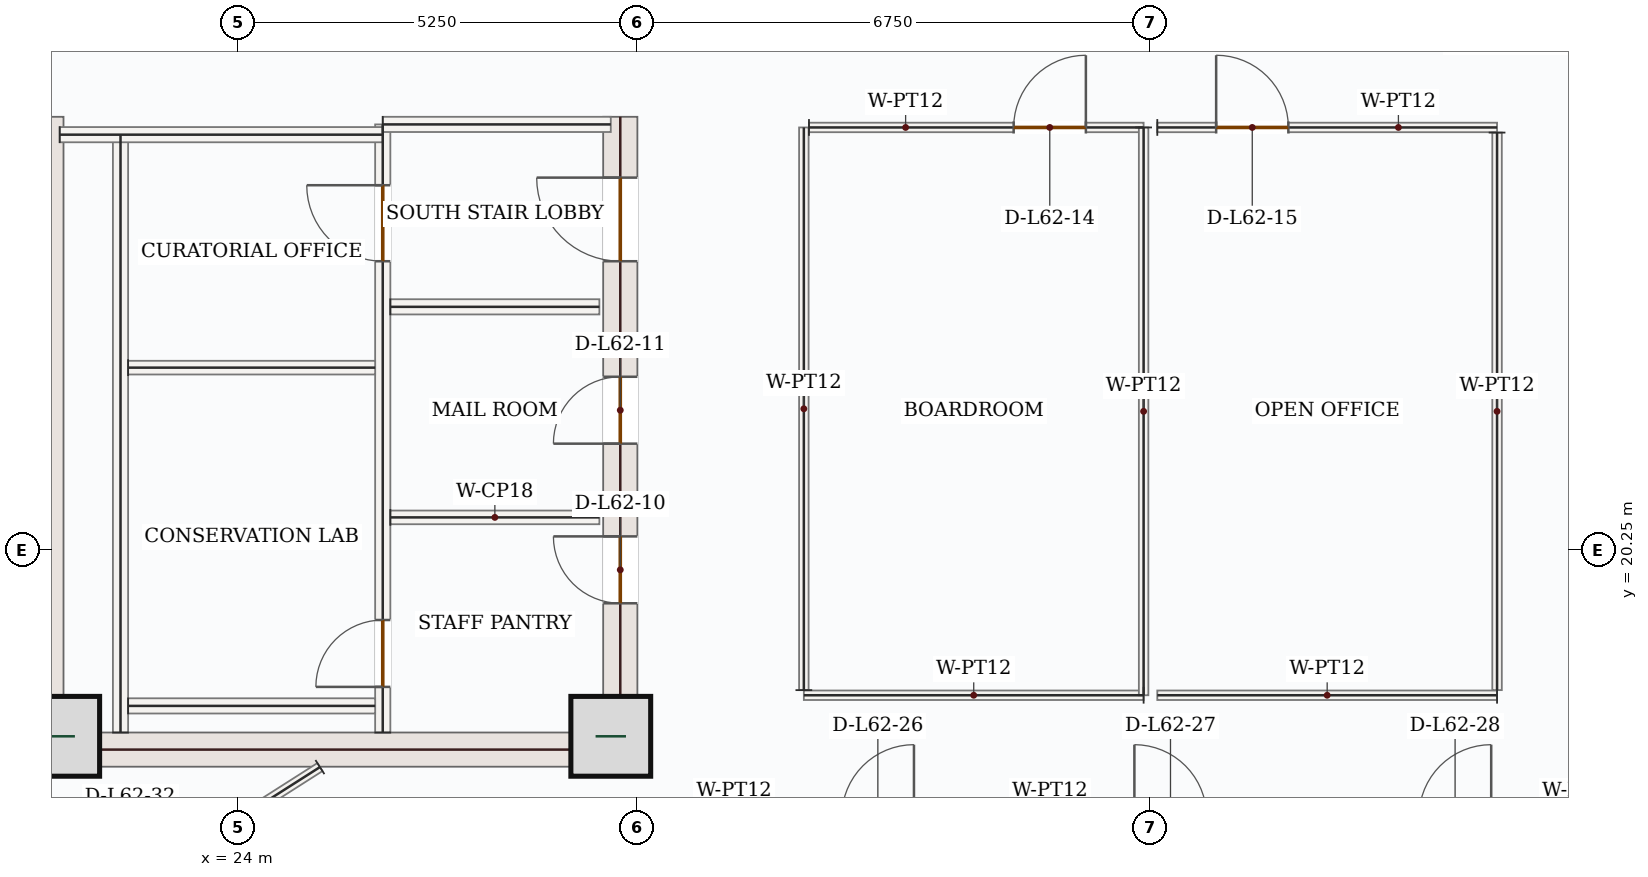
"""IFC4 building model, lengths in metres.
Left out: names, types, materials, properties, quantities, classifications, styles, units other than length and angle.
Written with IfcOpenShell. Run it as: python <this file> out.ifc"""

import sys

from ifc_helpers import new_model, si_unit, direction, frame, frame_2d, origin, origin_2d, place, context, subcontext, project, spatial, rectangle, extrude, source, transform, mapped, element, fill, save


model = new_model("IFC4")
c1 = context("Model", 3, precision=1e-05, world=origin(), true_north=direction((0.0, 1.0)))
c2 = subcontext(c1, "Body", "Model", "MODEL_VIEW")
j1 = project(units=[si_unit("LENGTHUNIT", "METRE"), si_unit("PLANEANGLEUNIT", "RADIAN")], contexts=[c1])
p1 = place(None, origin())
s1 = spatial("IfcSite", under=j1, at=p1, CompositionType="ELEMENT")
p2 = place(p1, origin())
s2 = spatial("IfcBuilding", under=s1, at=p2, CompositionType="ELEMENT")
p3 = place(p2, frame((0.0, 0.0, 261.6)))
s3 = spatial("IfcBuildingStorey", under=s2, at=p3, CompositionType="ELEMENT", Elevation=261.6)
m1 = source(origin(), c2, "Body", "SweptSolid", [
    extrude(rectangle(XDim=8.55, YDim=0.45, at=frame_2d((4.275, 0.0))), origin(), (0.0, 0.0, 1.0), 3.5),
])
p4 = place(p3, frame((21.475, 17.4, 0.0), z_axis=(0.0, 0.0, 1.0), x_axis=(0.0, 1.0, 0.0)))
e1 = element("IfcWall", 1, at=p4, inside=s3, PredefinedType="SHEAR", context=c2, shape_type="MappedRepresentation", body=[
    mapped(m1, transform((0.0, 0.0, 0.0), x_axis=(1.0, 0.0, 0.0), y_axis=(0.0, 1.0, 0.0), z_axis=(0.0, 0.0, 1.0), scale=1.0)),
])
p5 = place(p3, frame((29.025, 17.4, 0.0), z_axis=(0.0, 0.0, 1.0), x_axis=(0.0, 1.0, 0.0)))
e2 = element("IfcWall", 2, at=p5, inside=s3, PredefinedType="SHEAR", context=c2, shape_type="SweptSolid", body=[
    extrude(rectangle(XDim=8.55, YDim=0.45, at=frame_2d((4.275, 0.0))), origin(), (0.0, 0.0, 1.0), 3.5),
])
p6 = place(p5, frame((6.65, 0.0, 0.0)))
e3 = element("IfcOpeningElement", 3, at=p6, cuts=e2, PredefinedType="OPENING", context=c2, shape_type="SweptSolid", body=[
    extrude(rectangle(XDim=1.1, YDim=2.2, at=frame_2d((0.55, 1.1))), frame((0.0, 0.235, 0.0), z_axis=(0.0, -1.0, 0.0), x_axis=(1.0, 0.0, 0.0)), (0.0, 0.0, 1.0), 0.47),
])
p7 = place(p5, frame((2.15, 0.0, 0.0)))
e4 = element("IfcOpeningElement", 4, at=p7, cuts=e2, PredefinedType="OPENING", context=c2, shape_type="SweptSolid", body=[
    extrude(rectangle(XDim=0.88, YDim=2.1, at=frame_2d((0.44, 1.05))), frame((0.0, 0.235, 0.0), z_axis=(0.0, -1.0, 0.0), x_axis=(1.0, 0.0, 0.0)), (0.0, 0.0, 1.0), 0.47),
])
p8 = place(p5, frame((4.25, 0.0, 0.0)))
e5 = element("IfcOpeningElement", 5, at=p8, cuts=e2, PredefinedType="OPENING", context=c2, shape_type="SweptSolid", body=[
    extrude(rectangle(XDim=0.88, YDim=2.1, at=frame_2d((0.44, 1.05))), frame((0.0, 0.235, 0.0), z_axis=(0.0, -1.0, 0.0), x_axis=(1.0, 0.0, 0.0)), (0.0, 0.0, 1.0), 0.47),
])
m2 = source(origin(), c2, "Body", "SweptSolid", [
    extrude(rectangle(XDim=7.1, YDim=0.45, at=frame_2d((3.55, 0.0))), origin(), (0.0, 0.0, 1.0), 3.5),
])
p9 = place(p3, frame((21.7, 17.625, 0.0), z_axis=(0.0, 0.0, 1.0), x_axis=(1.0, 0.0, 0.0)))
e6 = element("IfcWall", 6, at=p9, inside=s3, PredefinedType="SHEAR", context=c2, shape_type="MappedRepresentation", body=[
    mapped(m2, transform((0.0, 0.0, 0.0), x_axis=(1.0, 0.0, 0.0), y_axis=(0.0, 1.0, 0.0), z_axis=(0.0, 0.0, 1.0), scale=1.0)),
])
m3 = source(origin(), c2, "Body", "SweptSolid", [
    extrude(rectangle(XDim=1.05, YDim=1.05, at=origin_2d()), origin(), (0.0, 0.0, 1.0), 3.75),
])
for number, where, z_axis, x_axis in (
    (7, (21.65, 17.8, 0.0), (0.0, 0.0, 1.0), (1.0, 0.0, 0.0)),
    (8, (28.9, 17.8, 0.0), (0.0, 0.0, 1.0), (1.0, 0.0, 0.0)),
):
    element("IfcColumn", number, at=place(p3, frame(where, z_axis=z_axis, x_axis=x_axis)), inside=s3, PredefinedType="COLUMN", context=c2, shape_type="MappedRepresentation", body=[
        mapped(m3, transform((0.0, 0.0, 0.0), x_axis=(1.0, 0.0, 0.0), y_axis=(0.0, 1.0, 0.0), z_axis=(0.0, 0.0, 1.0), scale=1.0)),
    ])
m4 = source(origin(), c2, "Body", "SweptSolid", [
    extrude(rectangle(XDim=7.87, YDim=0.2, at=frame_2d((3.935, 0.0))), origin(), (0.0, 0.0, 1.0), 3.5),
])
p10 = place(p3, frame((22.45, 17.85, 0.0), z_axis=(0.0, 0.0, 1.0), x_axis=(0.0, 1.0, 0.0)))
e9 = element("IfcWall", 9, at=p10, inside=s3, PredefinedType="SOLIDWALL", context=c2, shape_type="MappedRepresentation", body=[
    mapped(m4, transform((0.0, 0.0, 0.0), x_axis=(1.0, 0.0, 0.0), y_axis=(0.0, 1.0, 0.0), z_axis=(0.0, 0.0, 1.0), scale=1.0)),
])
p11 = place(p3, frame((25.9, 17.85, 0.0), z_axis=(0.0, 0.0, 1.0), x_axis=(0.0, 1.0, 0.0)))
e10 = element("IfcWall", 10, at=p11, inside=s3, PredefinedType="SOLIDWALL", context=c2, shape_type="SweptSolid", body=[
    extrude(rectangle(XDim=8.0, YDim=0.2, at=frame_2d((4.0, 0.0))), origin(), (0.0, 0.0, 1.0), 3.5),
])
p12 = place(p11, frame((6.2, 0.0, 0.0)))
e11 = element("IfcOpeningElement", 11, at=p12, cuts=e10, PredefinedType="OPENING", context=c2, shape_type="SweptSolid", body=[
    extrude(rectangle(XDim=1.0, YDim=2.15, at=frame_2d((0.5, 1.075))), frame((0.0, 0.11, 0.0), z_axis=(0.0, -1.0, 0.0), x_axis=(1.0, 0.0, 0.0)), (0.0, 0.0, 1.0), 0.22),
])
p13 = place(p11, frame((0.6, 0.0, 0.0)))
e12 = element("IfcOpeningElement", 12, at=p13, cuts=e10, PredefinedType="OPENING", context=c2, shape_type="SweptSolid", body=[
    extrude(rectangle(XDim=0.88, YDim=2.1, at=frame_2d((0.44, 1.05))), frame((0.0, 0.11, 0.0), z_axis=(0.0, -1.0, 0.0), x_axis=(1.0, 0.0, 0.0)), (0.0, 0.0, 1.0), 0.22),
])
m5 = source(origin(), c2, "Body", "SweptSolid", [
    extrude(rectangle(XDim=4.25, YDim=0.2, at=frame_2d((2.125, 0.0))), origin(), (0.0, 0.0, 1.0), 3.5),
])
p14 = place(p3, frame((21.65, 25.715, 0.0), z_axis=(0.0, 0.0, 1.0), x_axis=(1.0, 0.0, 0.0)))
e13 = element("IfcWall", 13, at=p14, inside=s3, PredefinedType="SOLIDWALL", context=c2, shape_type="MappedRepresentation", body=[
    mapped(m5, transform((0.0, 0.0, 0.0), x_axis=(1.0, 0.0, 0.0), y_axis=(0.0, 1.0, 0.0), z_axis=(0.0, 0.0, 1.0), scale=1.0)),
])
m6 = source(origin(), c2, "Body", "SweptSolid", [
    extrude(rectangle(XDim=3.0, YDim=0.2, at=frame_2d((1.5, 0.0))), origin(), (0.0, 0.0, 1.0), 3.5),
])
p15 = place(p3, frame((25.9, 25.85, 0.0), z_axis=(0.0, 0.0, 1.0), x_axis=(1.0, 0.0, 0.0)))
e14 = element("IfcWall", 14, at=p15, inside=s3, PredefinedType="SOLIDWALL", context=c2, shape_type="MappedRepresentation", body=[
    mapped(m6, transform((0.0, 0.0, 0.0), x_axis=(1.0, 0.0, 0.0), y_axis=(0.0, 1.0, 0.0), z_axis=(0.0, 0.0, 1.0), scale=1.0)),
])
m7 = source(origin(), c2, "Body", "SweptSolid", [
    extrude(rectangle(XDim=3.25, YDim=0.2, at=frame_2d((1.625, 0.0))), origin(), (0.0, 0.0, 1.0), 3.5),
])
p16 = place(p3, frame((22.55, 18.2, 0.0), z_axis=(0.0, 0.0, 1.0), x_axis=(1.0, 0.0, 0.0)))
e15 = element("IfcWall", 15, at=p16, inside=s3, PredefinedType="SOLIDWALL", context=c2, shape_type="MappedRepresentation", body=[
    mapped(m7, transform((0.0, 0.0, 0.0), x_axis=(1.0, 0.0, 0.0), y_axis=(0.0, 1.0, 0.0), z_axis=(0.0, 0.0, 1.0), scale=1.0)),
])
m8 = source(origin(), c2, "Body", "SweptSolid", [
    extrude(rectangle(XDim=3.25, YDim=0.18, at=frame_2d((1.625, 0.0))), origin(), (0.0, 0.0, 1.0), 3.5),
])
p17 = place(p3, frame((22.55, 22.65, 0.0), z_axis=(0.0, 0.0, 1.0), x_axis=(1.0, 0.0, 0.0)))
e16 = element("IfcWall", 16, at=p17, inside=s3, PredefinedType="PARTITIONING", context=c2, shape_type="MappedRepresentation", body=[
    mapped(m8, transform((0.0, 0.0, 0.0), x_axis=(1.0, 0.0, 0.0), y_axis=(0.0, 1.0, 0.0), z_axis=(0.0, 0.0, 1.0), scale=1.0)),
])
m9 = source(origin(), c2, "Body", "SweptSolid", [
    extrude(rectangle(XDim=2.75, YDim=0.2, at=frame_2d((1.375, 0.0))), origin(), (0.0, 0.0, 1.0), 3.5),
])
p18 = place(p3, frame((26.0, 23.45, 0.0), z_axis=(0.0, 0.0, 1.0), x_axis=(1.0, 0.0, 0.0)))
e17 = element("IfcWall", 17, at=p18, inside=s3, PredefinedType="SOLIDWALL", context=c2, shape_type="MappedRepresentation", body=[
    mapped(m9, transform((0.0, 0.0, 0.0), x_axis=(1.0, 0.0, 0.0), y_axis=(0.0, 1.0, 0.0), z_axis=(0.0, 0.0, 1.0), scale=1.0)),
])
m10 = source(origin(), c2, "Body", "SweptSolid", [
    extrude(rectangle(XDim=2.75, YDim=0.18, at=frame_2d((1.375, 0.0))), origin(), (0.0, 0.0, 1.0), 3.5),
])
p19 = place(p3, frame((26.0, 20.68, 0.0), z_axis=(0.0, 0.0, 1.0), x_axis=(1.0, 0.0, 0.0)))
e18 = element("IfcWall", 18, at=p19, inside=s3, PredefinedType="PARTITIONING", context=c2, shape_type="MappedRepresentation", body=[
    mapped(m10, transform((0.0, 0.0, 0.0), x_axis=(1.0, 0.0, 0.0), y_axis=(0.0, 1.0, 0.0), z_axis=(0.0, 0.0, 1.0), scale=1.0)),
])
p20 = place(p3, frame((25.073, 17.395, 0.0), z_axis=(0.0, 0.0, 1.0), x_axis=(-0.843398332862, -0.537288797693, 0.0)))
e19 = element("IfcWall", 19, at=p20, inside=s3, PredefinedType="PARTITIONING", context=c2, shape_type="SweptSolid", body=[
    extrude(rectangle(XDim=5.924, YDim=0.125, at=frame_2d((2.962, 0.0))), origin(), (0.0, 0.0, 1.0), 3.5),
])
p21 = place(p20, frame((2.487, 0.0, 0.0)))
e20 = element("IfcOpeningElement", 20, at=p21, cuts=e19, PredefinedType="OPENING", context=c2, shape_type="SweptSolid", body=[
    extrude(rectangle(XDim=0.95, YDim=2.15, at=frame_2d((0.475, 1.075))), frame((0.0, 0.073, 0.0), z_axis=(0.0, -1.0, 0.0), x_axis=(1.0, 0.0, 0.0)), (0.0, 0.0, 1.0), 0.145),
])
m11 = source(origin(), c2, "Body", "SweptSolid", [
    extrude(rectangle(XDim=4.47, YDim=0.125, at=frame_2d((2.235, 0.0))), origin(), (0.0, 0.0, 1.0), 3.5),
])
p22 = place(p3, frame((35.91, 18.34, 0.0), z_axis=(0.0, 0.0, 1.0), x_axis=(-1.0, 0.0, 0.0)))
e21 = element("IfcWall", 21, at=p22, inside=s3, PredefinedType="PARTITIONING", context=c2, shape_type="MappedRepresentation", body=[
    mapped(m11, transform((0.0, 0.0, 0.0), x_axis=(1.0, 0.0, 0.0), y_axis=(0.0, 1.0, 0.0), z_axis=(0.0, 0.0, 1.0), scale=1.0)),
])
m12 = source(origin(), c2, "Body", "SweptSolid", [
    extrude(rectangle(XDim=7.403, YDim=0.125, at=frame_2d((3.701, 0.0))), origin(), (0.0, 0.0, 1.0), 3.5),
])
p23 = place(p3, frame((31.44, 18.407, 0.0), z_axis=(0.0, 0.0, 1.0), x_axis=(0.0, 1.0, 0.0)))
e22 = element("IfcWall", 22, at=p23, inside=s3, PredefinedType="PARTITIONING", context=c2, shape_type="MappedRepresentation", body=[
    mapped(m12, transform((0.0, 0.0, 0.0), x_axis=(1.0, 0.0, 0.0), y_axis=(0.0, 1.0, 0.0), z_axis=(0.0, 0.0, 1.0), scale=1.0)),
])
p24 = place(p3, frame((31.508, 25.81, 0.0), z_axis=(0.0, 0.0, 1.0), x_axis=(1.0, 0.0, 0.0)))
e23 = element("IfcWall", 23, at=p24, inside=s3, PredefinedType="PARTITIONING", context=c2, shape_type="SweptSolid", body=[
    extrude(rectangle(XDim=4.402, YDim=0.125, at=frame_2d((2.201, 0.0))), origin(), (0.0, 0.0, 1.0), 3.5),
])
p25 = place(p24, frame((2.693, 0.0, 0.0)))
e24 = element("IfcOpeningElement", 24, at=p25, cuts=e23, PredefinedType="OPENING", context=c2, shape_type="SweptSolid", body=[
    extrude(rectangle(XDim=0.95, YDim=2.15, at=frame_2d((0.475, 1.075))), frame((0.0, 0.073, 0.0), z_axis=(0.0, -1.0, 0.0), x_axis=(1.0, 0.0, 0.0)), (0.0, 0.0, 1.0), 0.145),
])
m13 = source(origin(), c2, "Body", "SweptSolid", [
    extrude(rectangle(XDim=7.47, YDim=0.125, at=frame_2d((3.735, 0.0))), origin(), (0.0, 0.0, 1.0), 3.5),
])
p26 = place(p3, frame((35.91, 25.81, 0.0), z_axis=(0.0, 0.0, 1.0), x_axis=(0.0, -1.0, 0.0)))
e25 = element("IfcWall", 25, at=p26, inside=s3, PredefinedType="PARTITIONING", context=c2, shape_type="MappedRepresentation", body=[
    mapped(m13, transform((0.0, 0.0, 0.0), x_axis=(1.0, 0.0, 0.0), y_axis=(0.0, 1.0, 0.0), z_axis=(0.0, 0.0, 1.0), scale=1.0)),
])
p27 = place(p3, frame((40.56, 18.34, 0.0), z_axis=(0.0, 0.0, 1.0), x_axis=(-1.0, 0.0, 0.0)))
e26 = element("IfcWall", 26, at=p27, inside=s3, PredefinedType="PARTITIONING", context=c2, shape_type="MappedRepresentation", body=[
    mapped(m11, transform((0.0, 0.0, 0.0), x_axis=(1.0, 0.0, 0.0), y_axis=(0.0, 1.0, 0.0), z_axis=(0.0, 0.0, 1.0), scale=1.0)),
])
p28 = place(p3, frame((36.09, 25.81, 0.0), z_axis=(0.0, 0.0, 1.0), x_axis=(1.0, 0.0, 0.0)))
e27 = element("IfcWall", 27, at=p28, inside=s3, PredefinedType="PARTITIONING", context=c2, shape_type="SweptSolid", body=[
    extrude(rectangle(XDim=4.47, YDim=0.125, at=frame_2d((2.235, 0.0))), origin(), (0.0, 0.0, 1.0), 3.5),
])
p29 = place(p28, frame((0.774, 0.0, 0.0)))
e28 = element("IfcOpeningElement", 28, at=p29, cuts=e27, PredefinedType="OPENING", context=c2, shape_type="SweptSolid", body=[
    extrude(rectangle(XDim=0.95, YDim=2.15, at=frame_2d((0.475, 1.075))), frame((0.0, 0.073, 0.0), z_axis=(0.0, -1.0, 0.0), x_axis=(1.0, 0.0, 0.0)), (0.0, 0.0, 1.0), 0.145),
])
m14 = source(origin(), c2, "Body", "SweptSolid", [
    extrude(rectangle(XDim=7.335, YDim=0.125, at=frame_2d((3.667, 0.0))), origin(), (0.0, 0.0, 1.0), 3.5),
])
p30 = place(p3, frame((40.56, 25.742, 0.0), z_axis=(0.0, 0.0, 1.0), x_axis=(0.0, -1.0, 0.0)))
e29 = element("IfcWall", 29, at=p30, inside=s3, PredefinedType="PARTITIONING", context=c2, shape_type="MappedRepresentation", body=[
    mapped(m14, transform((0.0, 0.0, 0.0), x_axis=(1.0, 0.0, 0.0), y_axis=(0.0, 1.0, 0.0), z_axis=(0.0, 0.0, 1.0), scale=1.0)),
])
m15 = source(origin(), c2, "Body", "SweptSolid", [
    extrude(rectangle(XDim=1.0, YDim=2.15, at=frame_2d((0.5, 1.075))), frame((0.0, 0.025, 0.0), z_axis=(0.0, -1.0, 0.0), x_axis=(1.0, 0.0, 0.0)), (0.0, 0.0, 1.0), 0.05),
])
p31 = place(p12, origin())
e30 = element("IfcDoor", 30, at=p31, inside=s3, OperationType="SINGLE_SWING_RIGHT", PredefinedType="DOOR", context=c2, shape_type="MappedRepresentation", body=[
    mapped(m15, transform((0.0, 0.0, 0.0), x_axis=(1.0, 0.0, 0.0), y_axis=(0.0, 1.0, 0.0), z_axis=(0.0, 0.0, 1.0), scale=1.0)),
])
fill(e11, e30)
m16 = source(origin(), c2, "Body", "SweptSolid", [
    extrude(rectangle(XDim=0.88, YDim=2.1, at=frame_2d((0.44, 1.05))), frame((0.0, 0.025, 0.0), z_axis=(0.0, -1.0, 0.0), x_axis=(1.0, 0.0, 0.0)), (0.0, 0.0, 1.0), 0.05),
])
p32 = place(p13, origin())
e31 = element("IfcDoor", 31, at=p32, inside=s3, OperationType="SINGLE_SWING_LEFT", PredefinedType="DOOR", context=c2, shape_type="MappedRepresentation", body=[
    mapped(m16, transform((0.0, 0.0, 0.0), x_axis=(1.0, 0.0, 0.0), y_axis=(0.0, 1.0, 0.0), z_axis=(0.0, 0.0, 1.0), scale=1.0)),
])
fill(e12, e31)
m17 = source(origin(), c2, "Body", "SweptSolid", [
    extrude(rectangle(XDim=1.1, YDim=2.2, at=frame_2d((0.55, 1.1))), frame((0.0, 0.025, 0.0), z_axis=(0.0, -1.0, 0.0), x_axis=(1.0, 0.0, 0.0)), (0.0, 0.0, 1.0), 0.05),
])
p33 = place(p6, origin())
e32 = element("IfcDoor", 32, at=p33, inside=s3, OperationType="SINGLE_SWING_RIGHT", PredefinedType="DOOR", context=c2, shape_type="MappedRepresentation", body=[
    mapped(m17, transform((0.0, 0.0, 0.0), x_axis=(1.0, 0.0, 0.0), y_axis=(0.0, 1.0, 0.0), z_axis=(0.0, 0.0, 1.0), scale=1.0)),
])
fill(e3, e32)
p34 = place(p7, origin())
e33 = element("IfcDoor", 33, at=p34, inside=s3, OperationType="SINGLE_SWING_RIGHT", PredefinedType="DOOR", context=c2, shape_type="MappedRepresentation", body=[
    mapped(m16, transform((0.0, 0.0, 0.0), x_axis=(1.0, 0.0, 0.0), y_axis=(0.0, 1.0, 0.0), z_axis=(0.0, 0.0, 1.0), scale=1.0)),
])
fill(e4, e33)
p35 = place(p8, origin())
e34 = element("IfcDoor", 34, at=p35, inside=s3, OperationType="SINGLE_SWING_LEFT", PredefinedType="DOOR", context=c2, shape_type="MappedRepresentation", body=[
    mapped(m16, transform((0.0, 0.0, 0.0), x_axis=(1.0, 0.0, 0.0), y_axis=(0.0, 1.0, 0.0), z_axis=(0.0, 0.0, 1.0), scale=1.0)),
])
fill(e5, e34)
m18 = source(origin(), c2, "Body", "SweptSolid", [
    extrude(rectangle(XDim=0.95, YDim=2.15, at=frame_2d((0.475, 1.075))), frame((0.0, 0.025, 0.0), z_axis=(0.0, -1.0, 0.0), x_axis=(1.0, 0.0, 0.0)), (0.0, 0.0, 1.0), 0.05),
])
p36 = place(p25, origin())
e35 = element("IfcDoor", 35, at=p36, inside=s3, OperationType="SINGLE_SWING_RIGHT", PredefinedType="DOOR", context=c2, shape_type="MappedRepresentation", body=[
    mapped(m18, transform((0.0, 0.0, 0.0), x_axis=(1.0, 0.0, 0.0), y_axis=(0.0, 1.0, 0.0), z_axis=(0.0, 0.0, 1.0), scale=1.0)),
])
fill(e24, e35)
p37 = place(p29, origin())
e36 = element("IfcDoor", 36, at=p37, inside=s3, OperationType="SINGLE_SWING_LEFT", PredefinedType="DOOR", context=c2, shape_type="MappedRepresentation", body=[
    mapped(m18, transform((0.0, 0.0, 0.0), x_axis=(1.0, 0.0, 0.0), y_axis=(0.0, 1.0, 0.0), z_axis=(0.0, 0.0, 1.0), scale=1.0)),
])
fill(e28, e36)
save(model, sys.argv[1])
